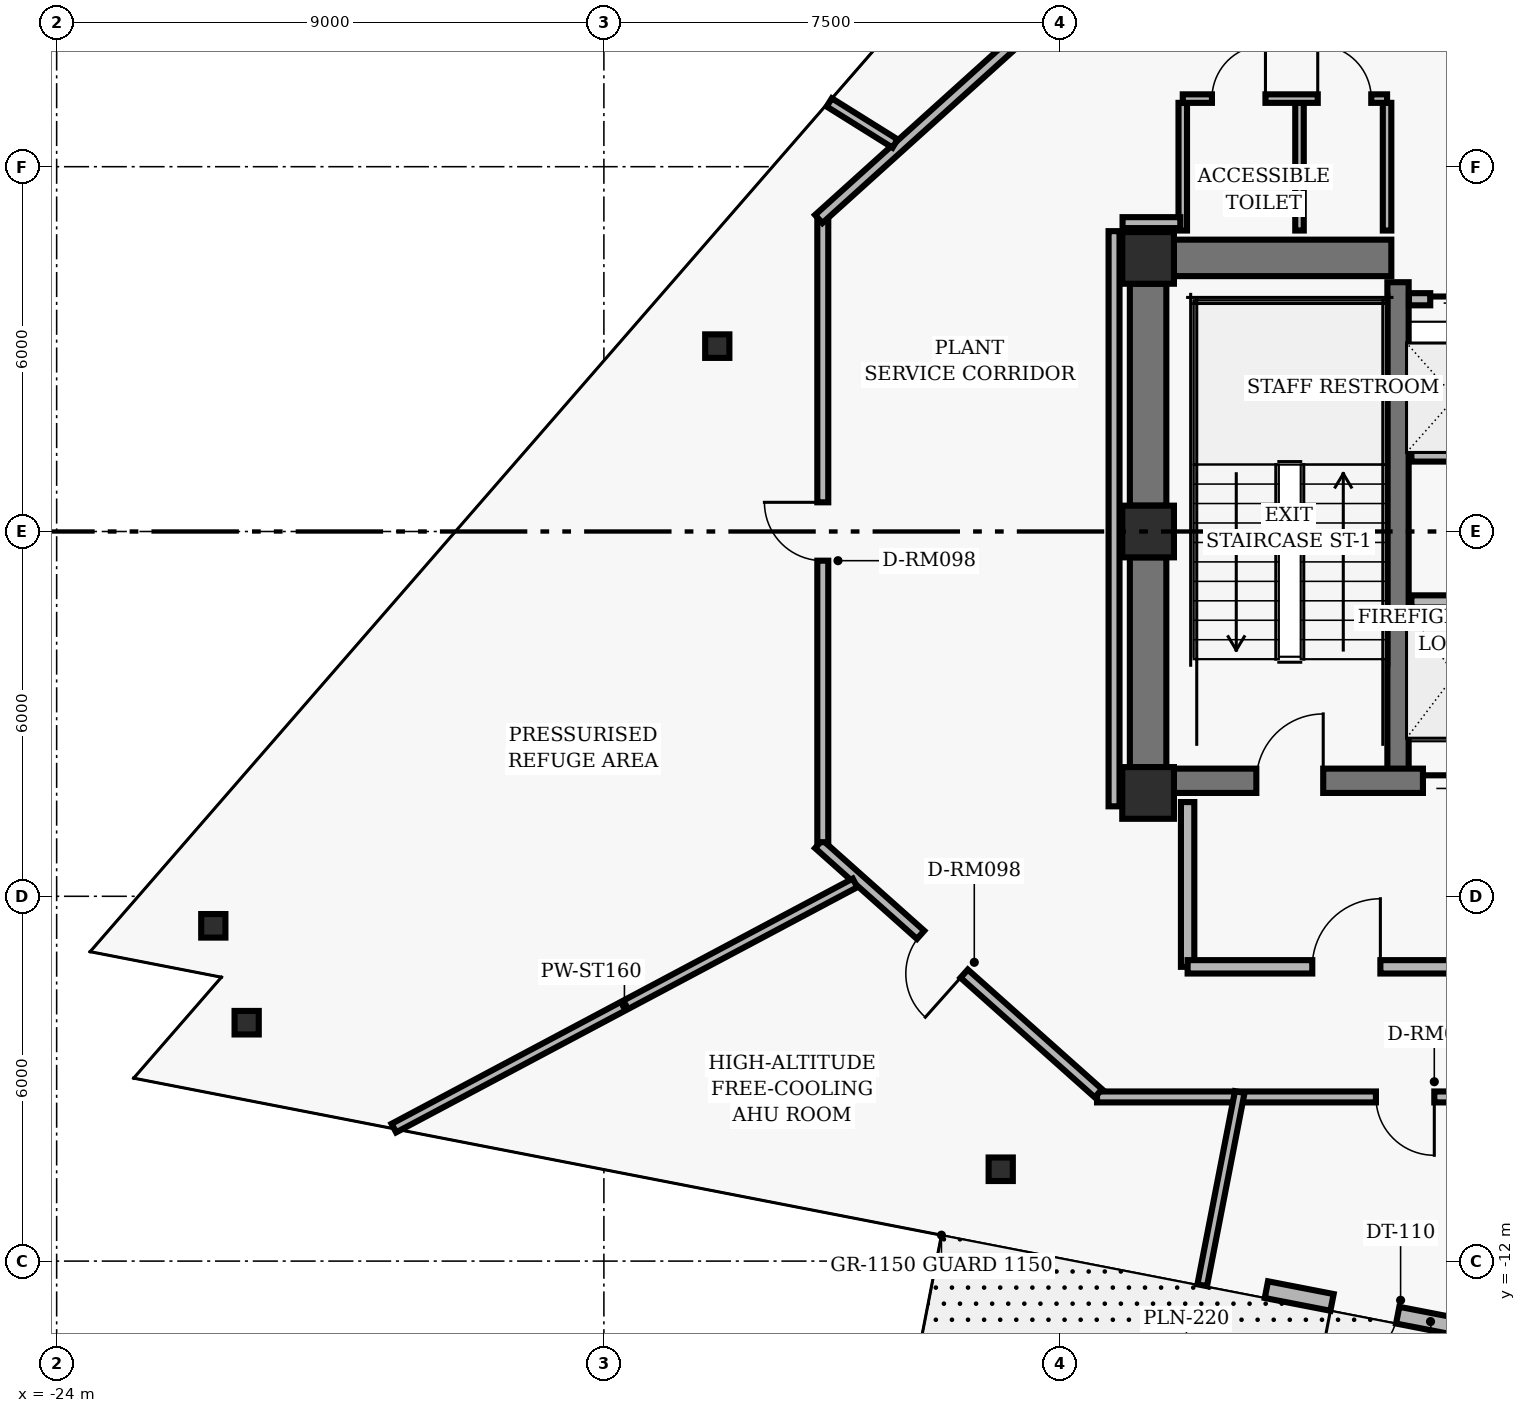
"""IFC4 building model, lengths in metres.
Left out: names, types, materials, properties, quantities, classifications, styles, units other than length and angle.
Written with IfcOpenShell. Run it as: python <this file> out.ifc"""

import sys

from ifc_helpers import new_model, si_unit, direction, frame, frame_2d, origin, origin_2d, place, context, subcontext, project, spatial, rectangle, hollow_rectangle, i_section, extrude, element, fill, save


model = new_model("IFC4")
c1 = context("Model", 3, precision=1e-05, world=origin(), true_north=direction((0.0, 1.0)))
c2 = subcontext(c1, "Body", "Model", "MODEL_VIEW")
j1 = project(units=[si_unit("LENGTHUNIT", "METRE"), si_unit("PLANEANGLEUNIT", "RADIAN")], contexts=[c1])
p1 = place(None, origin())
s1 = spatial("IfcSite", under=j1, at=p1, CompositionType="ELEMENT")
p2 = place(p1, origin())
s2 = spatial("IfcBuilding", under=s1, at=p2, CompositionType="ELEMENT")
p3 = place(p2, frame((0.0, 0.0, 171.52)))
s3 = spatial("IfcBuildingStorey", under=s2, at=p3, CompositionType="ELEMENT", Elevation=171.52)
for number, where, z_axis, x_axis in (
    (1, (-6.05, 4.5, 0.0), (0.0, 0.0, 1.0), (1.0, 0.0, 0.0)),
    (2, (-6.05, 0.0, 0.0), (0.0, 0.0, 1.0), (1.0, 0.0, 0.0)),
    (3, (-6.05, -4.3, 0.0), (0.0, 0.0, 1.0), (1.0, 0.0, 0.0)),
):
    element("IfcColumn", number, at=place(p3, frame(where, z_axis=z_axis, x_axis=x_axis)), inside=s3, PredefinedType="COLUMN", context=c2, shape_type="SweptSolid", body=[
        extrude(hollow_rectangle(XDim=0.85, YDim=0.85, WallThickness=0.055, InnerFilletRadius=0.02, OuterFilletRadius=0.04, at=origin_2d()), origin(), (0.0, 0.0, 1.0), 3.84),
    ])
p4 = place(p3, frame((-6.05, 0.425, 0.0), z_axis=(0.0, 0.0, 1.0), x_axis=(0.0, 1.0, 0.0)))
e4 = element("IfcWall", 4, at=p4, inside=s3, PredefinedType="SHEAR", context=c2, shape_type="SweptSolid", body=[
    extrude(rectangle(XDim=3.65, YDim=0.6, at=frame_2d((1.825, 0.0))), origin(), (0.0, 0.0, 1.0), 3.418),
])
p5 = place(p3, frame((-6.05, -3.875, 0.0), z_axis=(0.0, 0.0, 1.0), x_axis=(0.0, 1.0, 0.0)))
e5 = element("IfcWall", 5, at=p5, inside=s3, PredefinedType="SHEAR", context=c2, shape_type="SweptSolid", body=[
    extrude(rectangle(XDim=3.45, YDim=0.6, at=frame_2d((1.725, 0.0))), origin(), (0.0, 0.0, 1.0), 3.418),
])
p6 = place(p3, frame((-1.94, -4.1, 0.0), z_axis=(0.0, 0.0, 1.0), x_axis=(0.0, 1.0, 0.0)))
e6 = element("IfcWall", 6, at=p6, inside=s3, PredefinedType="SHEAR", context=c2, shape_type="SweptSolid", body=[
    extrude(rectangle(XDim=8.2, YDim=0.35, at=frame_2d((4.1, 0.0))), origin(), (0.0, 0.0, 1.0), 3.418),
])
p7 = place(p3, frame((-5.625, -4.1, 0.0), z_axis=(0.0, 0.0, 1.0), x_axis=(1.0, 0.0, 0.0)))
e7 = element("IfcWall", 7, at=p7, inside=s3, PredefinedType="SHEAR", context=c2, shape_type="SweptSolid", body=[
    extrude(rectangle(XDim=11.25, YDim=0.4, at=frame_2d((5.625, 0.0))), origin(), (0.0, 0.0, 1.0), 3.418),
])
p8 = place(p7, frame((1.355, 0.0, 0.0)))
e8 = element("IfcOpeningElement", 8, at=p8, cuts=e7, PredefinedType="OPENING", context=c2, shape_type="SweptSolid", body=[
    extrude(rectangle(XDim=1.1, YDim=2.04, at=frame_2d((0.55, 1.02))), frame((0.0, 0.21, 0.0), z_axis=(0.0, -1.0, 0.0), x_axis=(1.0, 0.0, 0.0)), (0.0, 0.0, 1.0), 0.42),
])
p9 = place(p7, frame((8.795, 0.0, 0.0)))
e9 = element("IfcOpeningElement", 9, at=p9, cuts=e7, PredefinedType="OPENING", context=c2, shape_type="SweptSolid", body=[
    extrude(rectangle(XDim=1.1, YDim=2.04, at=frame_2d((0.55, 1.02))), frame((0.0, 0.21, 0.0), z_axis=(0.0, -1.0, 0.0), x_axis=(1.0, 0.0, 0.0)), (0.0, 0.0, 1.0), 0.42),
])
p10 = place(p7, frame((4.095, 0.0, 0.0)))
e10 = element("IfcOpeningElement", 10, at=p10, cuts=e7, PredefinedType="OPENING", context=c2, shape_type="SweptSolid", body=[
    extrude(rectangle(XDim=1.06, YDim=2.04, at=frame_2d((0.53, 1.02))), frame((0.0, 0.21, 0.0), z_axis=(0.0, -1.0, 0.0), x_axis=(1.0, 0.0, 0.0)), (0.0, 0.0, 1.0), 0.42),
])
p11 = place(p7, frame((6.095, 0.0, 0.0)))
e11 = element("IfcOpeningElement", 11, at=p11, cuts=e7, PredefinedType="OPENING", context=c2, shape_type="SweptSolid", body=[
    extrude(rectangle(XDim=1.06, YDim=2.04, at=frame_2d((0.53, 1.02))), frame((0.0, 0.21, 0.0), z_axis=(0.0, -1.0, 0.0), x_axis=(1.0, 0.0, 0.0)), (0.0, 0.0, 1.0), 0.42),
])
p12 = place(p3, frame((-5.625, 4.5, 0.0), z_axis=(0.0, 0.0, 1.0), x_axis=(1.0, 0.0, 0.0)))
e12 = element("IfcWall", 12, at=p12, inside=s3, PredefinedType="SHEAR", context=c2, shape_type="SweptSolid", body=[
    extrude(rectangle(XDim=3.575, YDim=0.6, at=frame_2d((1.788, 0.0))), origin(), (0.0, 0.0, 1.0), 3.418),
])
for number, where, z_axis, x_axis in (
    (13, (-13.135, 3.049, 0.0), (0.0, 0.0, 1.0), (1.0, 0.0, 0.0)),
    (14, (-21.424, -6.486, 0.0), (0.0, 0.0, 1.0), (1.0, 0.0, 0.0)),
    (15, (-20.875, -8.079, 0.0), (0.0, 0.0, 1.0), (1.0, 0.0, 0.0)),
    (16, (-8.474, -10.49, 0.0), (0.0, 0.0, 1.0), (1.0, 0.0, 0.0)),
):
    element("IfcColumn", number, at=place(p3, frame(where, z_axis=z_axis, x_axis=x_axis)), inside=s3, PredefinedType="COLUMN", context=c2, shape_type="SweptSolid", body=[
        extrude(i_section(OverallWidth=0.398, OverallDepth=0.387, WebThickness=0.021, FlangeThickness=0.033, FilletRadius=0.018, at=origin_2d()), origin(), (0.0, 0.0, 1.0), 3.84),
    ])
p13 = place(p3, frame((-0.865, -13.099, 0.0), z_axis=(0.0, 0.0, 1.0), x_axis=(-0.981627709222, 0.19080629048, 0.0)))
e17 = element("IfcWall", 17, at=p13, inside=s3, PredefinedType="SOLIDWALL", context=c2, shape_type="SweptSolid", body=[
    extrude(rectangle(XDim=3.3, YDim=0.28, at=frame_2d((1.65, 0.0))), origin(), (0.0, 0.0, 1.0), 2.348),
])
p14 = place(p13, frame((1.1, 0.0, 0.0)))
e18 = element("IfcOpeningElement", 18, at=p14, cuts=e17, PredefinedType="OPENING", context=c2, shape_type="SweptSolid", body=[
    extrude(rectangle(XDim=1.1, YDim=2.15, at=frame_2d((0.55, 1.075))), frame((0.0, 0.15, 0.0), z_axis=(0.0, -1.0, 0.0), x_axis=(1.0, 0.0, 0.0)), (0.0, 0.0, 1.0), 0.3),
])
p15 = place(p3, frame((-1.72, -1.15, 0.0), z_axis=(0.0, 0.0, 1.0), x_axis=(1.0, 0.0, 0.0)))
e19 = element("IfcWall", 19, at=p15, inside=s3, PredefinedType="PARTITIONING", context=c2, shape_type="SweptSolid", body=[
    extrude(rectangle(XDim=3.44, YDim=0.2, at=frame_2d((1.72, 0.0))), origin(), (0.0, 0.0, 1.0), 3.393),
])
p16 = place(p3, frame((-5.4, -7.16, 0.0), z_axis=(0.0, 0.0, 1.0), x_axis=(0.0, 1.0, 0.0)))
e20 = element("IfcWall", 20, at=p16, inside=s3, PredefinedType="PARTITIONING", context=c2, shape_type="SweptSolid", body=[
    extrude(rectangle(XDim=2.71, YDim=0.22, at=frame_2d((1.355, 0.0))), origin(), (0.0, 0.0, 1.0), 3.393),
])
p17 = place(p3, frame((-5.4, -7.16, 0.0), z_axis=(0.0, 0.0, 1.0), x_axis=(1.0, 0.0, 0.0)))
e21 = element("IfcWall", 21, at=p17, inside=s3, PredefinedType="PARTITIONING", context=c2, shape_type="SweptSolid", body=[
    extrude(rectangle(XDim=5.4, YDim=0.22, at=frame_2d((2.7, 0.0))), origin(), (0.0, 0.0, 1.0), 3.393),
])
p18 = place(p17, frame((2.05, 0.0, 0.0)))
e22 = element("IfcOpeningElement", 22, at=p18, cuts=e21, PredefinedType="OPENING", context=c2, shape_type="SweptSolid", body=[
    extrude(rectangle(XDim=1.12, YDim=2.02, at=frame_2d((0.56, 1.01))), frame((0.0, 0.12, 0.0), z_axis=(0.0, -1.0, 0.0), x_axis=(1.0, 0.0, 0.0)), (0.0, 0.0, 1.0), 0.24),
])
p19 = place(p3, frame((-1.72, 1.25, 0.0), z_axis=(0.0, 0.0, 1.0), x_axis=(1.0, 0.0, 0.0)))
e23 = element("IfcWall", 23, at=p19, inside=s3, PredefinedType="PARTITIONING", context=c2, shape_type="SweptSolid", body=[
    extrude(rectangle(XDim=3.44, YDim=0.2, at=frame_2d((1.72, 0.0))), origin(), (0.0, 0.0, 1.0), 3.393),
])
p20 = place(p3, frame((-1.76, 3.82, 0.0), z_axis=(0.0, 0.0, 1.0), x_axis=(1.0, 0.0, 0.0)))
e24 = element("IfcWall", 24, at=p20, inside=s3, PredefinedType="PARTITIONING", context=c2, shape_type="SweptSolid", body=[
    extrude(rectangle(XDim=3.52, YDim=0.2, at=frame_2d((1.76, 0.0))), origin(), (0.0, 0.0, 1.0), 3.393),
])
p21 = place(p20, frame((0.35, 0.0, 0.0)))
e25 = element("IfcOpeningElement", 25, at=p21, cuts=e24, PredefinedType="OPENING", context=c2, shape_type="SweptSolid", body=[
    extrude(rectangle(XDim=1.06, YDim=2.04, at=frame_2d((0.53, 1.02))), frame((0.0, 0.11, 0.0), z_axis=(0.0, -1.0, 0.0), x_axis=(1.0, 0.0, 0.0)), (0.0, 0.0, 1.0), 0.22),
])
p22 = place(p20, frame((2.11, 0.0, 0.0)))
e26 = element("IfcOpeningElement", 26, at=p22, cuts=e24, PredefinedType="OPENING", context=c2, shape_type="SweptSolid", body=[
    extrude(rectangle(XDim=1.06, YDim=2.04, at=frame_2d((0.53, 1.02))), frame((0.0, 0.11, 0.0), z_axis=(0.0, -1.0, 0.0), x_axis=(1.0, 0.0, 0.0)), (0.0, 0.0, 1.0), 0.22),
])
for number, where, z_axis, x_axis in (
    (27, (-5.48, 4.95, 0.0), (0.0, 0.0, 1.0), (0.0, 1.0, 0.0)),
    (28, (-3.56, 4.95, 0.0), (0.0, 0.0, 1.0), (0.0, 1.0, 0.0)),
    (29, (-2.12, 4.95, 0.0), (0.0, 0.0, 1.0), (0.0, 1.0, 0.0)),
):
    element("IfcWall", number, at=place(p3, frame(where, z_axis=z_axis, x_axis=x_axis)), inside=s3, PredefinedType="PARTITIONING", context=c2, shape_type="SweptSolid", body=[
        extrude(rectangle(XDim=2.1, YDim=0.14, at=frame_2d((1.05, 0.0))), origin(), (0.0, 0.0, 1.0), 3.393),
    ])
p23 = place(p3, frame((-5.48, 7.12, 0.0), z_axis=(0.0, 0.0, 1.0), x_axis=(1.0, 0.0, 0.0)))
e30 = element("IfcWall", 30, at=p23, inside=s3, PredefinedType="PARTITIONING", context=c2, shape_type="SweptSolid", body=[
    extrude(rectangle(XDim=3.36, YDim=0.14, at=frame_2d((1.68, 0.0))), origin(), (0.0, 0.0, 1.0), 3.393),
])
p24 = place(p23, frame((0.48, 0.0, 0.0)))
e31 = element("IfcOpeningElement", 31, at=p24, cuts=e30, PredefinedType="OPENING", context=c2, shape_type="SweptSolid", body=[
    extrude(rectangle(XDim=0.88, YDim=2.02, at=frame_2d((0.44, 1.01))), frame((0.0, 0.08, 0.0), z_axis=(0.0, -1.0, 0.0), x_axis=(1.0, 0.0, 0.0)), (0.0, 0.0, 1.0), 0.16),
])
p25 = place(p23, frame((2.22, 0.0, 0.0)))
e32 = element("IfcOpeningElement", 32, at=p25, cuts=e30, PredefinedType="OPENING", context=c2, shape_type="SweptSolid", body=[
    extrude(rectangle(XDim=0.88, YDim=2.02, at=frame_2d((0.44, 1.01))), frame((0.0, 0.08, 0.0), z_axis=(0.0, -1.0, 0.0), x_axis=(1.0, 0.0, 0.0)), (0.0, 0.0, 1.0), 0.16),
])
p26 = place(p3, frame((6.71, -9.3, 0.0), z_axis=(0.0, 0.0, 1.0), x_axis=(-1.0, 0.0, 0.0)))
e33 = element("IfcWall", 33, at=p26, inside=s3, PredefinedType="PARTITIONING", context=c2, shape_type="SweptSolid", body=[
    extrude(rectangle(XDim=13.6, YDim=0.18, at=frame_2d((6.8, 0.0))), origin(), (0.0, 0.0, 1.0), 2.907),
])
p27 = place(p26, frame((8.053, 0.0, 0.0)))
e34 = element("IfcOpeningElement", 34, at=p27, cuts=e33, PredefinedType="OPENING", context=c2, shape_type="SweptSolid", body=[
    extrude(rectangle(XDim=0.96, YDim=2.02, at=frame_2d((0.48, 1.01))), frame((0.0, 0.1, 0.0), z_axis=(0.0, -1.0, 0.0), x_axis=(1.0, 0.0, 0.0)), (0.0, 0.0, 1.0), 0.2),
])
p28 = place(p26, frame((2.5, 0.0, 0.0)))
e35 = element("IfcOpeningElement", 35, at=p28, cuts=e33, PredefinedType="OPENING", context=c2, shape_type="SweptSolid", body=[
    extrude(rectangle(XDim=0.96, YDim=2.02, at=frame_2d((0.48, 1.01))), frame((0.0, 0.1, 0.0), z_axis=(0.0, -1.0, 0.0), x_axis=(1.0, 0.0, 0.0)), (0.0, 0.0, 1.0), 0.2),
])
p29 = place(p3, frame((-6.867, -9.24, 0.0), z_axis=(0.0, 0.0, 1.0), x_axis=(-0.746532095616, 0.665349404611, 0.0)))
e36 = element("IfcWall", 36, at=p29, inside=s3, PredefinedType="PARTITIONING", context=c2, shape_type="SweptSolid", body=[
    extrude(rectangle(XDim=6.162, YDim=0.18, at=frame_2d((3.081, 0.0))), origin(), (0.0, 0.0, 1.0), 3.393),
])
p30 = place(p29, frame((2.957, 0.0, 0.0)))
e37 = element("IfcOpeningElement", 37, at=p30, cuts=e36, PredefinedType="OPENING", context=c2, shape_type="SweptSolid", body=[
    extrude(rectangle(XDim=0.96, YDim=2.02, at=frame_2d((0.48, 1.01))), frame((0.0, 0.1, 0.0), z_axis=(0.0, -1.0, 0.0), x_axis=(1.0, 0.0, 0.0)), (0.0, 0.0, 1.0), 0.2),
])
p31 = place(p3, frame((-11.4, -5.11, 0.0), z_axis=(0.0, 0.0, 1.0), x_axis=(0.0, 1.0, 0.0)))
e38 = element("IfcWall", 38, at=p31, inside=s3, PredefinedType="PARTITIONING", context=c2, shape_type="SweptSolid", body=[
    extrude(rectangle(XDim=10.22, YDim=0.18, at=frame_2d((5.11, 0.0))), origin(), (0.0, 0.0, 1.0), 3.393),
])
p32 = place(p31, frame((4.63, 0.0, 0.0)))
e39 = element("IfcOpeningElement", 39, at=p32, cuts=e38, PredefinedType="OPENING", context=c2, shape_type="SweptSolid", body=[
    extrude(rectangle(XDim=0.96, YDim=2.02, at=frame_2d((0.48, 1.01))), frame((0.0, 0.1, 0.0), z_axis=(0.0, -1.0, 0.0), x_axis=(1.0, 0.0, 0.0)), (0.0, 0.0, 1.0), 0.2),
])
p33 = place(p3, frame((-11.467, 5.14, 0.0), z_axis=(0.0, 0.0, 1.0), x_axis=(0.742486327971, 0.669861219042, 0.0)))
e40 = element("IfcWall", 40, at=p33, inside=s3, PredefinedType="PARTITIONING", context=c2, shape_type="SweptSolid", body=[
    extrude(rectangle(XDim=6.196, YDim=0.18, at=frame_2d((3.098, 0.0))), origin(), (0.0, 0.0, 1.0), 2.365),
])
p34 = place(p3, frame((-6.61, 4.94, 0.0), z_axis=(0.0, 0.0, 1.0), x_axis=(0.0, -1.0, 0.0)))
e41 = element("IfcWall", 41, at=p34, inside=s3, PredefinedType="PARTITIONING", context=c2, shape_type="SweptSolid", body=[
    extrude(rectangle(XDim=9.46, YDim=0.18, at=frame_2d((4.73, 0.0))), origin(), (0.0, 0.0, 1.0), 3.393),
])
p35 = place(p3, frame((-5.52, 5.08, 0.0), z_axis=(0.0, 0.0, 1.0), x_axis=(-1.0, 0.0, 0.0)))
e42 = element("IfcWall", 42, at=p35, inside=s3, PredefinedType="PARTITIONING", context=c2, shape_type="SweptSolid", body=[
    extrude(rectangle(XDim=0.95, YDim=0.18, at=frame_2d((0.475, 0.0))), origin(), (0.0, 0.0, 1.0), 3.393),
])
p36 = place(p3, frame((-10.87, -5.78, 0.0), z_axis=(0.0, 0.0, 1.0), x_axis=(-0.882949343716, -0.469468269887, 0.0)))
e43 = element("IfcWall", 43, at=p36, inside=s3, PredefinedType="PARTITIONING", context=c2, shape_type="SweptSolid", body=[
    extrude(rectangle(XDim=8.591, YDim=0.16, at=frame_2d((4.295, 0.0))), origin(), (0.0, 0.0, 1.0), 2.6),
])
p37 = place(p3, frame((-10.211, 6.381, 0.0), z_axis=(0.0, 0.0, 1.0), x_axis=(-0.848127172329, 0.529792694888, 0.0)))
e44 = element("IfcWall", 44, at=p37, inside=s3, PredefinedType="PARTITIONING", context=c2, shape_type="SweptSolid", body=[
    extrude(rectangle(XDim=1.277, YDim=0.16, at=frame_2d((0.638, 0.0))), origin(), (0.0, 0.0, 1.0), 3.393),
])
p38 = place(p3, frame((-4.543, -9.22, 0.0), z_axis=(0.0, 0.0, 1.0), x_axis=(-0.190788889502, -0.98163109142, 0.0)))
e45 = element("IfcWall", 45, at=p38, inside=s3, PredefinedType="PARTITIONING", context=c2, shape_type="SweptSolid", body=[
    extrude(rectangle(XDim=3.236, YDim=0.16, at=frame_2d((1.618, 0.0))), origin(), (0.0, 0.0, 1.0), 3.393),
])
p39 = place(p14, origin())
e46 = element("IfcDoor", 46, at=p39, inside=s3, OperationType="SINGLE_SWING_RIGHT", PredefinedType="DOOR", context=c2, shape_type="SweptSolid", body=[
    extrude(rectangle(XDim=1.1, YDim=2.15, at=frame_2d((0.55, 1.075))), frame((0.0, 0.025, 0.0), z_axis=(0.0, -1.0, 0.0), x_axis=(1.0, 0.0, 0.0)), (0.0, 0.0, 1.0), 0.05),
])
fill(e18, e46)
p40 = place(p8, origin())
e47 = element("IfcDoor", 47, at=p40, inside=s3, OperationType="SINGLE_SWING_RIGHT", PredefinedType="DOOR", context=c2, shape_type="SweptSolid", body=[
    extrude(rectangle(XDim=1.1, YDim=2.04, at=frame_2d((0.55, 1.02))), frame((0.0, 0.025, 0.0), z_axis=(0.0, -1.0, 0.0), x_axis=(1.0, 0.0, 0.0)), (0.0, 0.0, 1.0), 0.05),
])
fill(e8, e47)
p41 = place(p10, origin())
e48 = element("IfcDoor", 48, at=p41, inside=s3, OperationType="SLIDING_TO_LEFT", PredefinedType="DOOR", context=c2, shape_type="SweptSolid", body=[
    extrude(rectangle(XDim=1.06, YDim=2.04, at=frame_2d((0.53, 1.02))), frame((0.0, 0.025, 0.0), z_axis=(0.0, -1.0, 0.0), x_axis=(1.0, 0.0, 0.0)), (0.0, 0.0, 1.0), 0.05),
])
fill(e10, e48)
p42 = place(p18, origin())
e49 = element("IfcDoor", 49, at=p42, inside=s3, OperationType="SINGLE_SWING_RIGHT", PredefinedType="DOOR", context=c2, shape_type="SweptSolid", body=[
    extrude(rectangle(XDim=1.12, YDim=2.02, at=frame_2d((0.56, 1.01))), frame((0.0, 0.025, 0.0), z_axis=(0.0, -1.0, 0.0), x_axis=(1.0, 0.0, 0.0)), (0.0, 0.0, 1.0), 0.05),
])
fill(e22, e49)
p43 = place(p21, origin())
e50 = element("IfcDoor", 50, at=p43, inside=s3, OperationType="SLIDING_TO_LEFT", PredefinedType="DOOR", context=c2, shape_type="SweptSolid", body=[
    extrude(rectangle(XDim=1.06, YDim=2.04, at=frame_2d((0.53, 1.02))), frame((0.0, 0.025, 0.0), z_axis=(0.0, -1.0, 0.0), x_axis=(1.0, 0.0, 0.0)), (0.0, 0.0, 1.0), 0.05),
])
fill(e25, e50)
p44 = place(p24, origin())
e51 = element("IfcDoor", 51, at=p44, inside=s3, OperationType="SINGLE_SWING_RIGHT", PredefinedType="DOOR", context=c2, shape_type="SweptSolid", body=[
    extrude(rectangle(XDim=0.88, YDim=2.02, at=frame_2d((0.44, 1.01))), frame((0.0, 0.025, 0.0), z_axis=(0.0, -1.0, 0.0), x_axis=(1.0, 0.0, 0.0)), (0.0, 0.0, 1.0), 0.05),
])
fill(e31, e51)
p45 = place(p25, origin())
e52 = element("IfcDoor", 52, at=p45, inside=s3, OperationType="SINGLE_SWING_LEFT", PredefinedType="DOOR", context=c2, shape_type="SweptSolid", body=[
    extrude(rectangle(XDim=0.88, YDim=2.02, at=frame_2d((0.44, 1.01))), frame((0.0, 0.025, 0.0), z_axis=(0.0, -1.0, 0.0), x_axis=(1.0, 0.0, 0.0)), (0.0, 0.0, 1.0), 0.05),
])
fill(e32, e52)
p46 = place(p27, origin())
e53 = element("IfcDoor", 53, at=p46, inside=s3, OperationType="SINGLE_SWING_LEFT", PredefinedType="DOOR", context=c2, shape_type="SweptSolid", body=[
    extrude(rectangle(XDim=0.96, YDim=2.02, at=frame_2d((0.48, 1.01))), frame((0.0, 0.025, 0.0), z_axis=(0.0, -1.0, 0.0), x_axis=(1.0, 0.0, 0.0)), (0.0, 0.0, 1.0), 0.05),
])
fill(e34, e53)
p47 = place(p32, origin())
e54 = element("IfcDoor", 54, at=p47, inside=s3, OperationType="SINGLE_SWING_RIGHT", PredefinedType="DOOR", context=c2, shape_type="SweptSolid", body=[
    extrude(rectangle(XDim=0.96, YDim=2.02, at=frame_2d((0.48, 1.01))), frame((0.0, 0.025, 0.0), z_axis=(0.0, -1.0, 0.0), x_axis=(1.0, 0.0, 0.0)), (0.0, 0.0, 1.0), 0.05),
])
fill(e39, e54)
p48 = place(p30, origin())
e55 = element("IfcDoor", 55, at=p48, inside=s3, OperationType="SINGLE_SWING_LEFT", PredefinedType="DOOR", context=c2, shape_type="SweptSolid", body=[
    extrude(rectangle(XDim=0.96, YDim=2.02, at=frame_2d((0.48, 1.01))), frame((0.0, 0.025, 0.0), z_axis=(0.0, -1.0, 0.0), x_axis=(1.0, 0.0, 0.0)), (0.0, 0.0, 1.0), 0.05),
])
fill(e37, e55)
save(model, sys.argv[1])
